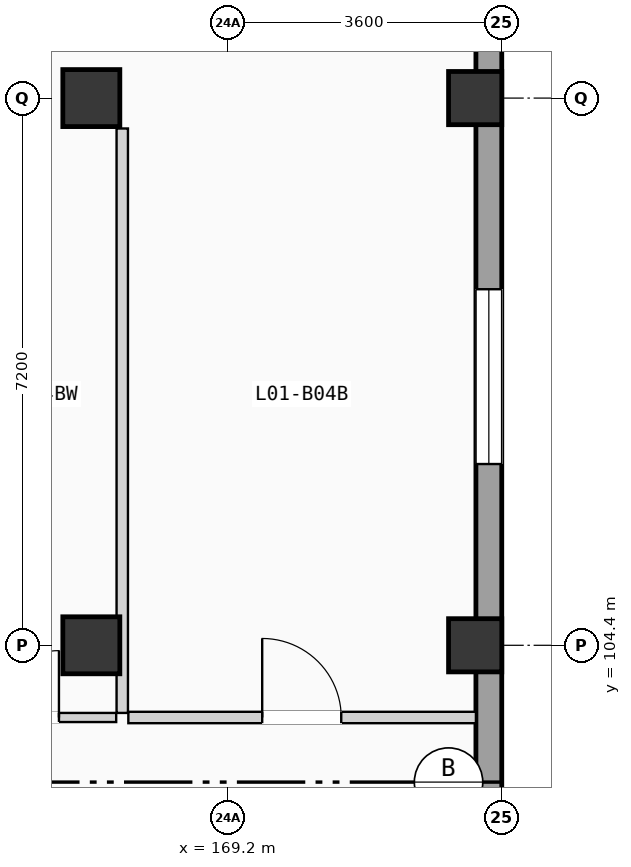
"""IFC4 building model, lengths in metres.
Left out: names, types, materials, properties, quantities, classifications, styles, units other than length and angle.
Written with IfcOpenShell. Run it as: python <this file> out.ifc"""

import sys

from ifc_helpers import new_model, si_unit, direction, frame, frame_2d, origin, origin_2d, place, context, subcontext, project, spatial, rectangle, extrude, element, fill, save


model = new_model("IFC4")
c1 = context("Model", 3, precision=1e-05, world=origin(), true_north=direction((0.0, 1.0)))
c2 = subcontext(c1, "Body", "Model", "MODEL_VIEW")
j1 = project(units=[si_unit("LENGTHUNIT", "METRE"), si_unit("PLANEANGLEUNIT", "RADIAN")], contexts=[c1])
p1 = place(None, origin())
s1 = spatial("IfcSite", under=j1, at=p1, CompositionType="ELEMENT")
p2 = place(p1, origin())
s2 = spatial("IfcBuilding", under=s1, at=p2, CompositionType="ELEMENT")
p3 = place(p2, frame((0.0, 0.0, 4.9)))
s3 = spatial("IfcBuildingStorey", under=s2, at=p3, CompositionType="ELEMENT", Elevation=4.9)
for number, where, z_axis, x_axis in (
    (1, (167.4, 104.4, 0.0), (0.0, 0.0, 1.0), (1.0, 0.0, 0.0)),
    (2, (167.4, 111.6, 0.0), (0.0, 0.0, 1.0), (1.0, 0.0, 0.0)),
):
    element("IfcColumn", number, at=place(p3, frame(where, z_axis=z_axis, x_axis=x_axis)), inside=s3, PredefinedType="COLUMN", context=c2, shape_type="SweptSolid", body=[
        extrude(rectangle(XDim=0.75, YDim=0.75, at=origin_2d()), origin(), (0.0, 0.0, 1.0), 3.675),
    ])
for number, where, z_axis, x_axis in (
    (3, (172.45, 104.4, 0.0), (0.0, 0.0, 1.0), (1.0, 0.0, 0.0)),
    (4, (172.45, 111.6, 0.0), (0.0, 0.0, 1.0), (1.0, 0.0, 0.0)),
):
    element("IfcColumn", number, at=place(p3, frame(where, z_axis=z_axis, x_axis=x_axis)), inside=s3, PredefinedType="COLUMN", context=c2, shape_type="SweptSolid", body=[
        extrude(rectangle(XDim=0.7, YDim=0.7, at=origin_2d()), origin(), (0.0, 0.0, 1.0), 3.675),
    ])
p4 = place(p3, frame((172.63, 68.74, 0.0), z_axis=(0.0, 0.0, 1.0), x_axis=(0.0, 1.0, 0.0)))
e5 = element("IfcWall", 5, at=p4, inside=s3, PredefinedType="SOLIDWALL", context=c2, shape_type="SweptSolid", body=[
    extrude(rectangle(XDim=49.72, YDim=0.34, at=frame_2d((24.86, 0.0))), origin(), (0.0, 0.0, 1.0), 3.415),
])
p5 = place(p4, frame((14.749, 0.0, 0.9)))
e6 = element("IfcOpeningElement", 6, at=p5, cuts=e5, PredefinedType="OPENING", context=c2, shape_type="SweptSolid", body=[
    extrude(rectangle(XDim=2.15, YDim=1.5, at=frame_2d((1.075, 0.75))), frame((0.0, 0.18, 0.0), z_axis=(0.0, -1.0, 0.0), x_axis=(1.0, 0.0, 0.0)), (0.0, 0.0, 1.0), 0.36),
])
p6 = place(p4, frame((8.422, 0.0, 0.9)))
e7 = element("IfcOpeningElement", 7, at=p6, cuts=e5, PredefinedType="OPENING", context=c2, shape_type="SweptSolid", body=[
    extrude(rectangle(XDim=2.15, YDim=1.65, at=frame_2d((1.075, 0.825))), frame((0.0, 0.18, 0.0), z_axis=(0.0, -1.0, 0.0), x_axis=(1.0, 0.0, 0.0)), (0.0, 0.0, 1.0), 0.36),
])
p7 = place(p4, frame((18.16, 0.0, 0.9)))
e8 = element("IfcOpeningElement", 8, at=p7, cuts=e5, PredefinedType="OPENING", context=c2, shape_type="SweptSolid", body=[
    extrude(rectangle(XDim=2.15, YDim=1.8, at=frame_2d((1.075, 0.9))), frame((0.0, 0.18, 0.0), z_axis=(0.0, -1.0, 0.0), x_axis=(1.0, 0.0, 0.0)), (0.0, 0.0, 1.0), 0.36),
])
p8 = place(p4, frame((30.91, 0.0, 0.9)))
e9 = element("IfcOpeningElement", 9, at=p8, cuts=e5, PredefinedType="OPENING", context=c2, shape_type="SweptSolid", body=[
    extrude(rectangle(XDim=2.3, YDim=1.2, at=frame_2d((1.15, 0.6))), frame((0.0, 0.18, 0.0), z_axis=(0.0, -1.0, 0.0), x_axis=(1.0, 0.0, 0.0)), (0.0, 0.0, 1.0), 0.36),
])
p9 = place(p4, frame((24.012, 0.0, 0.9)))
e10 = element("IfcOpeningElement", 10, at=p9, cuts=e5, PredefinedType="OPENING", context=c2, shape_type="SweptSolid", body=[
    extrude(rectangle(XDim=2.3, YDim=1.35, at=frame_2d((1.15, 0.675))), frame((0.0, 0.18, 0.0), z_axis=(0.0, -1.0, 0.0), x_axis=(1.0, 0.0, 0.0)), (0.0, 0.0, 1.0), 0.36),
])
p10 = place(p4, frame((38.045, 0.0, 0.9)))
e11 = element("IfcOpeningElement", 11, at=p10, cuts=e5, PredefinedType="OPENING", context=c2, shape_type="SweptSolid", body=[
    extrude(rectangle(XDim=2.3, YDim=1.5, at=frame_2d((1.15, 0.75))), frame((0.0, 0.18, 0.0), z_axis=(0.0, -1.0, 0.0), x_axis=(1.0, 0.0, 0.0)), (0.0, 0.0, 1.0), 0.36),
])
p11 = place(p3, frame((167.887, 103.45, 0.0), z_axis=(0.0, 0.0, 1.0), x_axis=(1.0, 0.0, 0.0)))
e12 = element("IfcWall", 12, at=p11, inside=s3, PredefinedType="PARTITIONING", context=c2, shape_type="SweptSolid", body=[
    extrude(rectangle(XDim=4.573, YDim=0.15, at=frame_2d((2.287, 0.0))), origin(), (0.0, 0.0, 1.0), 3.395),
])
p12 = place(p11, frame((1.761, 0.0, 0.0)))
e13 = element("IfcOpeningElement", 13, at=p12, cuts=e12, PredefinedType="OPENING", context=c2, shape_type="SweptSolid", body=[
    extrude(rectangle(XDim=1.04, YDim=2.08, at=frame_2d((0.52, 1.04))), frame((0.0, 0.085, 0.0), z_axis=(0.0, -1.0, 0.0), x_axis=(1.0, 0.0, 0.0)), (0.0, 0.0, 1.0), 0.17),
])
p13 = place(p3, frame((165.34, 103.45, 0.0), z_axis=(0.0, 0.0, 1.0), x_axis=(1.0, 0.0, 0.0)))
e14 = element("IfcWall", 14, at=p13, inside=s3, PredefinedType="PARTITIONING", context=c2, shape_type="SweptSolid", body=[
    extrude(rectangle(XDim=2.387, YDim=0.12, at=frame_2d((1.193, 0.0))), origin(), (0.0, 0.0, 1.0), 3.395),
])
p14 = place(p13, frame((0.754, 0.0, 0.0)))
e15 = element("IfcOpeningElement", 15, at=p14, cuts=e14, PredefinedType="OPENING", context=c2, shape_type="SweptSolid", body=[
    extrude(rectangle(XDim=0.88, YDim=2.02, at=frame_2d((0.44, 1.01))), frame((0.0, 0.07, 0.0), z_axis=(0.0, -1.0, 0.0), x_axis=(1.0, 0.0, 0.0)), (0.0, 0.0, 1.0), 0.14),
])
p15 = place(p3, frame((167.807, 103.51, 0.0), z_axis=(0.0, 0.0, 1.0), x_axis=(0.0, 1.0, 0.0)))
e16 = element("IfcWall", 16, at=p15, inside=s3, PredefinedType="PARTITIONING", context=c2, shape_type="SweptSolid", body=[
    extrude(rectangle(XDim=7.69, YDim=0.15, at=frame_2d((3.845, 0.0))), origin(), (0.0, 0.0, 1.0), 3.395),
])
p16 = place(p10, origin())
e17 = element("IfcWindow", 17, at=p16, inside=s3, PartitioningType="DOUBLE_PANEL_VERTICAL", PredefinedType="WINDOW", context=c2, shape_type="SweptSolid", body=[
    extrude(rectangle(XDim=2.3, YDim=1.5, at=frame_2d((1.15, 0.75))), frame((0.0, 0.03, 0.0), z_axis=(0.0, -1.0, 0.0), x_axis=(1.0, 0.0, 0.0)), (0.0, 0.0, 1.0), 0.06),
])
fill(e11, e17)
p17 = place(p12, origin())
e18 = element("IfcDoor", 18, at=p17, inside=s3, OperationType="SINGLE_SWING_LEFT", PredefinedType="DOOR", context=c2, shape_type="SweptSolid", body=[
    extrude(rectangle(XDim=1.04, YDim=2.08, at=frame_2d((0.52, 1.04))), frame((0.0, 0.025, 0.0), z_axis=(0.0, -1.0, 0.0), x_axis=(1.0, 0.0, 0.0)), (0.0, 0.0, 1.0), 0.05),
])
fill(e13, e18)
p18 = place(p14, origin())
e19 = element("IfcDoor", 19, at=p18, inside=s3, OperationType="SINGLE_SWING_RIGHT", PredefinedType="DOOR", context=c2, shape_type="SweptSolid", body=[
    extrude(rectangle(XDim=0.88, YDim=2.02, at=frame_2d((0.44, 1.01))), frame((0.0, 0.025, 0.0), z_axis=(0.0, -1.0, 0.0), x_axis=(1.0, 0.0, 0.0)), (0.0, 0.0, 1.0), 0.05),
])
fill(e15, e19)
save(model, sys.argv[1])
